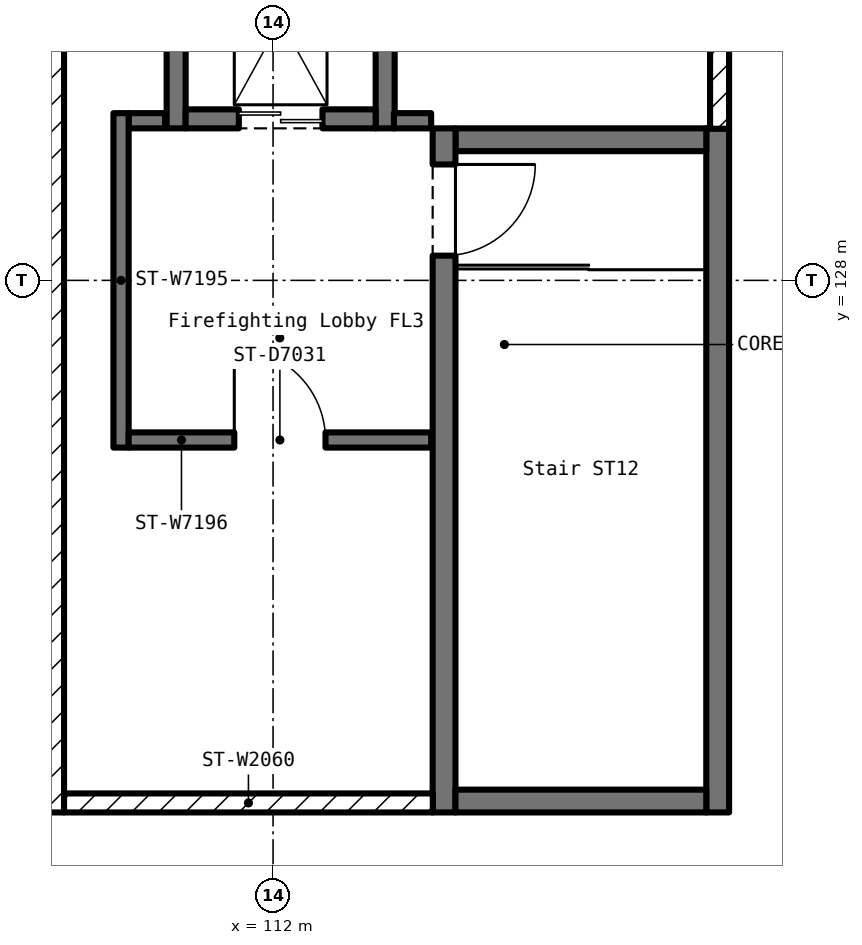
"""IFC4 building model, lengths in metres.
Left out: names, types, materials, properties, quantities, classifications, styles, units other than length and angle.
Written with IfcOpenShell. Run it as: python <this file> out.ifc"""

import sys

from ifc_helpers import new_model, si_unit, direction, frame, frame_2d, origin, place, context, subcontext, project, spatial, rectangle, extrude, element, fill, save


model = new_model("IFC4")
c1 = context("Model", 3, precision=1e-05, world=origin(), true_north=direction((0.0, 1.0)))
c2 = subcontext(c1, "Body", "Model", "MODEL_VIEW")
j1 = project(units=[si_unit("LENGTHUNIT", "METRE"), si_unit("PLANEANGLEUNIT", "RADIAN")], contexts=[c1])
p1 = place(None, origin())
s1 = spatial("IfcSite", under=j1, at=p1, CompositionType="ELEMENT")
p2 = place(p1, origin())
s2 = spatial("IfcBuilding", under=s1, at=p2, CompositionType="ELEMENT")
p3 = place(p2, frame((0.0, 0.0, 34.0)))
s3 = spatial("IfcBuildingStorey", under=s2, at=p3, CompositionType="ELEMENT", Elevation=34.0)
p4 = place(p3, frame((117.85, 121.0, 0.0), z_axis=(0.0, 0.0, 1.0), x_axis=(0.0, 1.0, 0.0)))
e1 = element("IfcWall", 1, at=p4, inside=s3, PredefinedType="SOLIDWALL", context=c2, shape_type="SweptSolid", body=[
    extrude(rectangle(XDim=9.0, YDim=0.3, at=frame_2d((4.5, 0.0))), origin(), (0.0, 0.0, 1.0), 5.75),
])
p5 = place(p3, frame((117.7, 129.85, 0.0), z_axis=(0.0, 0.0, 1.0), x_axis=(-1.0, 0.0, 0.0)))
e2 = element("IfcWall", 2, at=p5, inside=s3, PredefinedType="SOLIDWALL", context=c2, shape_type="SweptSolid", body=[
    extrude(rectangle(XDim=3.3, YDim=0.3, at=frame_2d((1.65, 0.0))), origin(), (0.0, 0.0, 1.0), 5.75),
])
p6 = place(p3, frame((114.25, 130.0, 0.0), z_axis=(0.0, 0.0, 1.0), x_axis=(0.0, -1.0, 0.0)))
e3 = element("IfcWall", 3, at=p6, inside=s3, PredefinedType="SOLIDWALL", context=c2, shape_type="SweptSolid", body=[
    extrude(rectangle(XDim=9.0, YDim=0.3, at=frame_2d((4.5, 0.0))), origin(), (0.0, 0.0, 1.0), 5.75),
])
p7 = place(p6, frame((0.475, 0.0, 0.0)))
e4 = element("IfcOpeningElement", 4, at=p7, cuts=e3, PredefinedType="OPENING", context=c2, shape_type="SweptSolid", body=[
    extrude(rectangle(XDim=1.2, YDim=2.1, at=frame_2d((0.6, 1.05))), frame((0.0, 0.162, 0.0), z_axis=(0.0, -1.0, 0.0), x_axis=(1.0, 0.0, 0.0)), (0.0, 0.0, 1.0), 0.324),
])
p8 = place(p3, frame((114.4, 121.15, 0.0), z_axis=(0.0, 0.0, 1.0), x_axis=(1.0, 0.0, 0.0)))
e5 = element("IfcWall", 5, at=p8, inside=s3, PredefinedType="SOLIDWALL", context=c2, shape_type="SweptSolid", body=[
    extrude(rectangle(XDim=3.3, YDim=0.3, at=frame_2d((1.65, 0.0))), origin(), (0.0, 0.0, 1.0), 5.75),
])
for number, where, z_axis, x_axis in (
    (6, (113.475, 130.0, 0.0), (0.0, 0.0, 1.0), (0.0, 1.0, 0.0)),
    (7, (110.725, 134.0, 0.0), (0.0, 0.0, 1.0), (0.0, -1.0, 0.0)),
):
    element("IfcWall", number, at=place(p3, frame(where, z_axis=z_axis, x_axis=x_axis)), inside=s3, PredefinedType="SOLIDWALL", context=c2, shape_type="SweptSolid", body=[
        extrude(rectangle(XDim=4.0, YDim=0.25, at=frame_2d((2.0, 0.0))), origin(), (0.0, 0.0, 1.0), 5.75),
    ])
p9 = place(p3, frame((110.85, 130.125, 0.0), z_axis=(0.0, 0.0, 1.0), x_axis=(1.0, 0.0, 0.0)))
e8 = element("IfcWall", 8, at=p9, inside=s3, PredefinedType="SOLIDWALL", context=c2, shape_type="SweptSolid", body=[
    extrude(rectangle(XDim=2.5, YDim=0.25, at=frame_2d((1.25, 0.0))), origin(), (0.0, 0.0, 1.0), 5.75),
])
p10 = place(p9, frame((0.7, 0.0, 0.0)))
e9 = element("IfcOpeningElement", 9, at=p10, cuts=e8, PredefinedType="OPENING", context=c2, shape_type="SweptSolid", body=[
    extrude(rectangle(XDim=1.1, YDim=2.1, at=frame_2d((0.55, 1.05))), frame((0.0, 0.137, 0.0), z_axis=(0.0, -1.0, 0.0), x_axis=(1.0, 0.0, 0.0)), (0.0, 0.0, 1.0), 0.274),
])
p11 = place(p3, frame((114.08, 130.1, 0.0), z_axis=(0.0, 0.0, 1.0), x_axis=(-1.0, 0.0, 0.0)))
e10 = element("IfcWall", 10, at=p11, inside=s3, PredefinedType="PARTITIONING", context=c2, shape_type="SweptSolid", body=[
    extrude(rectangle(XDim=0.49, YDim=0.2, at=frame_2d((0.245, 0.0))), origin(), (0.0, 0.0, 1.0), 5.75),
])
p12 = place(p3, frame((110.58, 130.1, 0.0), z_axis=(0.0, 0.0, 1.0), x_axis=(-1.0, 0.0, 0.0)))
e11 = element("IfcWall", 11, at=p12, inside=s3, PredefinedType="PARTITIONING", context=c2, shape_type="SweptSolid", body=[
    extrude(rectangle(XDim=0.48, YDim=0.2, at=frame_2d((0.24, 0.0))), origin(), (0.0, 0.0, 1.0), 5.75),
])
p13 = place(p3, frame((110.0, 130.2, 0.0), z_axis=(0.0, 0.0, 1.0), x_axis=(0.0, -1.0, 0.0)))
e12 = element("IfcWall", 12, at=p13, inside=s3, PredefinedType="PARTITIONING", context=c2, shape_type="SweptSolid", body=[
    extrude(rectangle(XDim=4.4, YDim=0.2, at=frame_2d((2.2, 0.0))), origin(), (0.0, 0.0, 1.0), 5.75),
])
p14 = place(p3, frame((110.1, 125.9, 0.0), z_axis=(0.0, 0.0, 1.0), x_axis=(1.0, 0.0, 0.0)))
e13 = element("IfcWall", 13, at=p14, inside=s3, PredefinedType="PARTITIONING", context=c2, shape_type="SweptSolid", body=[
    extrude(rectangle(XDim=3.98, YDim=0.2, at=frame_2d((1.99, 0.0))), origin(), (0.0, 0.0, 1.0), 5.75),
])
p15 = place(p14, frame((1.39, 0.0, 0.0)))
e14 = element("IfcOpeningElement", 14, at=p15, cuts=e13, PredefinedType="OPENING", context=c2, shape_type="SweptSolid", body=[
    extrude(rectangle(XDim=1.2, YDim=2.1, at=frame_2d((0.6, 1.05))), frame((0.0, 0.112, 0.0), z_axis=(0.0, -1.0, 0.0), x_axis=(1.0, 0.0, 0.0)), (0.0, 0.0, 1.0), 0.224),
])
p16 = place(p3, frame((117.875, 129.995, 0.0), z_axis=(0.0, 0.0, 1.0), x_axis=(0.0, 1.0, 0.0)))
e15 = element("IfcWall", 15, at=p16, inside=s3, PredefinedType="SOLIDWALL", context=c2, shape_type="SweptSolid", body=[
    extrude(rectangle(XDim=5.005, YDim=0.25, at=frame_2d((2.502, 0.0))), origin(), (0.0, 0.0, 1.0), 5.75),
])
p17 = place(p16, frame((1.43, 0.0, 2.6)))
e16 = element("IfcOpeningElement", 16, at=p17, cuts=e15, PredefinedType="OPENING", context=c2, shape_type="SweptSolid", body=[
    extrude(rectangle(XDim=2.4, YDim=1.2, at=frame_2d((1.2, 0.6))), frame((0.0, 0.137, 0.0), z_axis=(0.0, -1.0, 0.0), x_axis=(1.0, 0.0, 0.0)), (0.0, 0.0, 1.0), 0.274),
])
p18 = place(p3, frame((109.125, 134.75, 0.0), z_axis=(0.0, 0.0, 1.0), x_axis=(0.0, -1.0, 0.0)))
e17 = element("IfcWall", 17, at=p18, inside=s3, PredefinedType="SOLIDWALL", context=c2, shape_type="SweptSolid", body=[
    extrude(rectangle(XDim=13.75, YDim=0.25, at=frame_2d((6.875, 0.0))), origin(), (0.0, 0.0, 1.0), 5.75),
])
p19 = place(p3, frame((109.25, 121.125, 0.0), z_axis=(0.0, 0.0, 1.0), x_axis=(1.0, 0.0, 0.0)))
e18 = element("IfcWall", 18, at=p19, inside=s3, PredefinedType="SOLIDWALL", context=c2, shape_type="SweptSolid", body=[
    extrude(rectangle(XDim=4.852, YDim=0.25, at=frame_2d((2.426, 0.0))), origin(), (0.0, 0.0, 1.0), 5.75),
])
p20 = place(p7, origin())
e19 = element("IfcDoor", 19, at=p20, inside=s3, OperationType="SINGLE_SWING_LEFT", PredefinedType="DOOR", context=c2, shape_type="SweptSolid", body=[
    extrude(rectangle(XDim=1.2, YDim=2.1, at=frame_2d((0.6, 1.05))), frame((0.0, 0.025, 0.0), z_axis=(0.0, -1.0, 0.0), x_axis=(1.0, 0.0, 0.0)), (0.0, 0.0, 1.0), 0.05),
])
fill(e4, e19)
p21 = place(p10, origin())
e20 = element("IfcDoor", 20, at=p21, inside=s3, OperationType="DOUBLE_DOOR_SLIDING", PredefinedType="DOOR", context=c2, shape_type="SweptSolid", body=[
    extrude(rectangle(XDim=1.1, YDim=2.1, at=frame_2d((0.55, 1.05))), frame((0.0, 0.025, 0.0), z_axis=(0.0, -1.0, 0.0), x_axis=(1.0, 0.0, 0.0)), (0.0, 0.0, 1.0), 0.05),
])
fill(e9, e20)
p22 = place(p15, origin())
e21 = element("IfcDoor", 21, at=p22, inside=s3, OperationType="SINGLE_SWING_LEFT", PredefinedType="DOOR", context=c2, shape_type="SweptSolid", body=[
    extrude(rectangle(XDim=1.2, YDim=2.1, at=frame_2d((0.6, 1.05))), frame((0.0, 0.025, 0.0), z_axis=(0.0, -1.0, 0.0), x_axis=(1.0, 0.0, 0.0)), (0.0, 0.0, 1.0), 0.05),
])
fill(e14, e21)
save(model, sys.argv[1])
